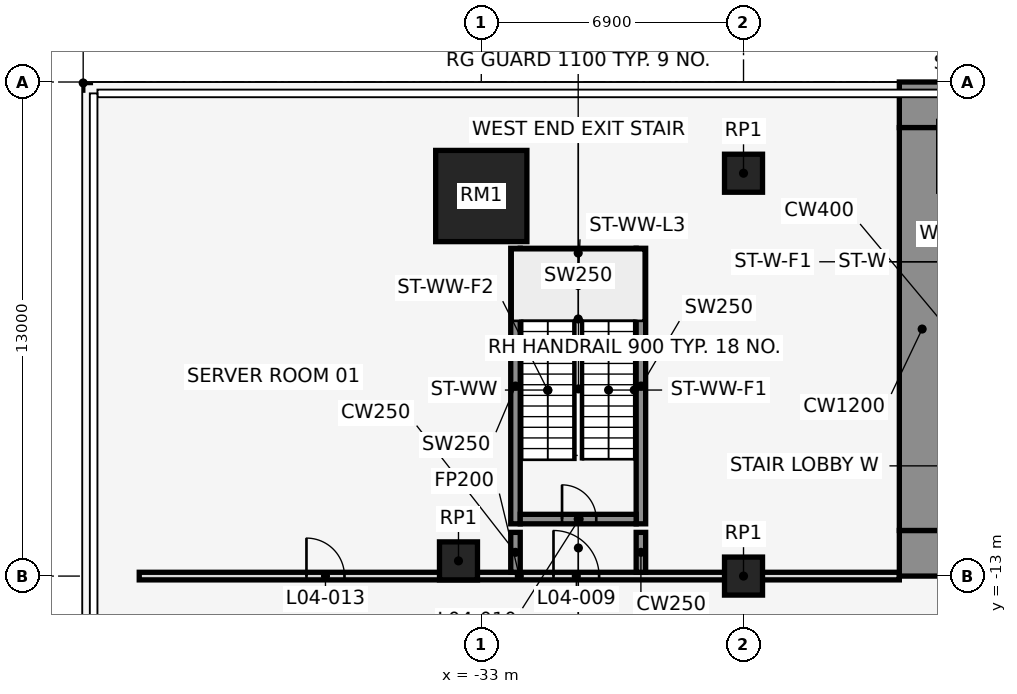
"""IFC4 building model, lengths in metres.
Left out: names, types, materials, properties, quantities, classifications, styles, units other than length and angle.
Written with IfcOpenShell. Run it as: python <this file> out.ifc"""

import sys

from ifc_helpers import new_model, si_unit, direction, frame, frame_2d, origin, origin_2d, place, context, subcontext, project, spatial, rectangle, extrude, element, fill, save


model = new_model("IFC4")
c1 = context("Model", 3, precision=1e-05, world=origin(), true_north=direction((0.0, 1.0)))
c2 = subcontext(c1, "Body", "Model", "MODEL_VIEW")
j1 = project(units=[si_unit("LENGTHUNIT", "METRE"), si_unit("PLANEANGLEUNIT", "RADIAN")], contexts=[c1])
p1 = place(None, origin())
s1 = spatial("IfcSite", under=j1, at=p1, CompositionType="ELEMENT")
p2 = place(p1, origin())
s2 = spatial("IfcBuilding", under=s1, at=p2, CompositionType="ELEMENT")
p3 = place(p2, frame((0.0, 0.0, 25.0)))
s3 = spatial("IfcBuildingStorey", under=s2, at=p3, CompositionType="ELEMENT", Elevation=25.0)
p4 = place(p3, frame((-33.0, -3.0, 0.0), z_axis=(0.0, 0.0, 1.0), x_axis=(1.0, 0.0, 0.0)))
e1 = element("IfcColumn", 1, at=p4, inside=s3, PredefinedType="COLUMN", context=c2, shape_type="SweptSolid", body=[
    extrude(rectangle(XDim=2.4, YDim=2.4, at=origin_2d()), origin(), (0.0, 0.0, 1.0), 5.0),
])
for number, where, z_axis, x_axis in (
    (2, (-26.1, -2.4, 0.0), (0.0, 0.0, 1.0), (1.0, 0.0, 0.0)),
    (3, (-33.6, -12.6, 0.0), (0.0, 0.0, 1.0), (1.0, 0.0, 0.0)),
    (4, (-26.1, -13.0, 0.0), (0.0, 0.0, 1.0), (1.0, 0.0, 0.0)),
):
    element("IfcColumn", number, at=place(p3, frame(where, z_axis=z_axis, x_axis=x_axis)), inside=s3, PredefinedType="COLUMN", context=c2, shape_type="SweptSolid", body=[
        extrude(rectangle(XDim=1.0, YDim=1.0, at=origin_2d()), origin(), (0.0, 0.0, 1.0), 5.0),
    ])
for number, where, z_axis, x_axis in (
    (5, (-32.1, -11.625, 0.0), (0.0, 0.0, 1.0), (0.0, 1.0, 0.0)),
    (6, (-28.8, -11.625, 0.0), (0.0, 0.0, 1.0), (0.0, 1.0, 0.0)),
):
    element("IfcWall", number, at=place(p3, frame(where, z_axis=z_axis, x_axis=x_axis)), inside=s3, PredefinedType="SHEAR", context=c2, shape_type="SweptSolid", body=[
        extrude(rectangle(XDim=7.25, YDim=0.25, at=frame_2d((3.625, 0.0))), origin(), (0.0, 0.0, 1.0), 5.0),
    ])
p5 = place(p3, frame((-31.975, -11.5, 0.0), z_axis=(0.0, 0.0, 1.0), x_axis=(1.0, 0.0, 0.0)))
e7 = element("IfcWall", 7, at=p5, inside=s3, PredefinedType="SHEAR", context=c2, shape_type="SweptSolid", body=[
    extrude(rectangle(XDim=3.05, YDim=0.25, at=frame_2d((1.525, 0.0))), origin(), (0.0, 0.0, 1.0), 5.0),
])
p6 = place(p5, frame((1.1, 0.0, 0.0)))
e8 = element("IfcOpeningElement", 8, at=p6, cuts=e7, PredefinedType="OPENING", context=c2, shape_type="SweptSolid", body=[
    extrude(rectangle(XDim=0.9, YDim=2.1, at=frame_2d((0.45, 1.05))), frame((0.0, 0.137, 0.0), z_axis=(0.0, -1.0, 0.0), x_axis=(1.0, 0.0, 0.0)), (0.0, 0.0, 1.0), 0.274),
])
p7 = place(p3, frame((-31.975, -4.5, 0.0), z_axis=(0.0, 0.0, 1.0), x_axis=(1.0, 0.0, 0.0)))
e9 = element("IfcWall", 9, at=p7, inside=s3, PredefinedType="SHEAR", context=c2, shape_type="SweptSolid", body=[
    extrude(rectangle(XDim=3.05, YDim=0.25, at=frame_2d((1.525, 0.0))), origin(), (0.0, 0.0, 1.0), 5.0),
])
p8 = place(p3, frame((-42.0, -13.0, 0.0), z_axis=(0.0, 0.0, 1.0), x_axis=(1.0, 0.0, 0.0)))
e10 = element("IfcWall", 10, at=p8, inside=s3, PredefinedType="PARTITIONING", context=c2, shape_type="SweptSolid", body=[
    extrude(rectangle(XDim=20.0, YDim=0.2, at=frame_2d((10.0, 0.0))), origin(), (0.0, 0.0, 1.0), 4.7),
])
p9 = place(p8, frame((10.9, 0.0, 0.0)))
e11 = element("IfcOpeningElement", 11, at=p9, cuts=e10, PredefinedType="OPENING", context=c2, shape_type="SweptSolid", body=[
    extrude(rectangle(XDim=1.2, YDim=2.1, at=frame_2d((0.6, 1.05))), frame((0.0, 0.112, 0.0), z_axis=(0.0, -1.0, 0.0), x_axis=(1.0, 0.0, 0.0)), (0.0, 0.0, 1.0), 0.224),
])
p10 = place(p8, frame((4.4, 0.0, 0.0)))
e12 = element("IfcOpeningElement", 12, at=p10, cuts=e10, PredefinedType="OPENING", context=c2, shape_type="SweptSolid", body=[
    extrude(rectangle(XDim=1.0, YDim=2.1, at=frame_2d((0.5, 1.05))), frame((0.0, 0.112, 0.0), z_axis=(0.0, -1.0, 0.0), x_axis=(1.0, 0.0, 0.0)), (0.0, 0.0, 1.0), 0.224),
])
for number, where, z_axis, x_axis in (
    (13, (-32.1, -12.9, 0.0), (0.0, 0.0, 1.0), (0.0, 1.0, 0.0)),
    (14, (-28.8, -12.9, 0.0), (0.0, 0.0, 1.0), (0.0, 1.0, 0.0)),
):
    element("IfcWall", number, at=place(p3, frame(where, z_axis=z_axis, x_axis=x_axis)), inside=s3, PredefinedType="SHEAR", context=c2, shape_type="SweptSolid", body=[
        extrude(rectangle(XDim=1.05, YDim=0.25, at=frame_2d((0.525, 0.0))), origin(), (0.0, 0.0, 1.0), 5.0),
    ])
p11 = place(p3, frame((-22.0, -0.6, 0.0), z_axis=(0.0, 0.0, 1.0), x_axis=(1.0, 0.0, 0.0)))
e15 = element("IfcWall", 15, at=p11, inside=s3, PredefinedType="SHEAR", context=c2, shape_type="SweptSolid", body=[
    extrude(rectangle(XDim=44.0, YDim=1.2, at=frame_2d((22.0, 0.0))), origin(), (0.0, 0.0, 1.0), 5.0),
])
p12 = place(p3, frame((-22.0, -12.4, 0.0), z_axis=(0.0, 0.0, 1.0), x_axis=(1.0, 0.0, 0.0)))
e16 = element("IfcWall", 16, at=p12, inside=s3, PredefinedType="SHEAR", context=c2, shape_type="SweptSolid", body=[
    extrude(rectangle(XDim=44.0, YDim=1.2, at=frame_2d((22.0, 0.0))), origin(), (0.0, 0.0, 1.0), 5.0),
])
p13 = place(p12, frame((2.2, 0.0, 0.0)))
e17 = element("IfcOpeningElement", 17, at=p13, cuts=e16, PredefinedType="OPENING", context=c2, shape_type="SweptSolid", body=[
    extrude(rectangle(XDim=1.2, YDim=2.1, at=frame_2d((0.6, 1.05))), frame((0.0, 0.612, 0.0), z_axis=(0.0, -1.0, 0.0), x_axis=(1.0, 0.0, 0.0)), (0.0, 0.0, 1.0), 1.224),
])
p14 = place(p12, frame((21.4, 0.0, 0.0)))
e18 = element("IfcOpeningElement", 18, at=p14, cuts=e16, PredefinedType="OPENING", context=c2, shape_type="SweptSolid", body=[
    extrude(rectangle(XDim=1.2, YDim=2.1, at=frame_2d((0.6, 1.05))), frame((0.0, 0.612, 0.0), z_axis=(0.0, -1.0, 0.0), x_axis=(1.0, 0.0, 0.0)), (0.0, 0.0, 1.0), 1.224),
])
p15 = place(p12, frame((40.6, 0.0, 0.0)))
e19 = element("IfcOpeningElement", 19, at=p15, cuts=e16, PredefinedType="OPENING", context=c2, shape_type="SweptSolid", body=[
    extrude(rectangle(XDim=1.2, YDim=2.1, at=frame_2d((0.6, 1.05))), frame((0.0, 0.612, 0.0), z_axis=(0.0, -1.0, 0.0), x_axis=(1.0, 0.0, 0.0)), (0.0, 0.0, 1.0), 1.224),
])
p16 = place(p12, frame((16.0, 0.0, 0.0)))
e20 = element("IfcOpeningElement", 20, at=p16, cuts=e16, PredefinedType="OPENING", context=c2, shape_type="SweptSolid", body=[
    extrude(rectangle(XDim=1.8, YDim=2.1, at=frame_2d((0.9, 1.05))), frame((0.0, 0.612, 0.0), z_axis=(0.0, -1.0, 0.0), x_axis=(1.0, 0.0, 0.0)), (0.0, 0.0, 1.0), 1.224),
])
p17 = place(p12, frame((6.3, 0.0, 0.0)))
e21 = element("IfcOpeningElement", 21, at=p17, cuts=e16, PredefinedType="OPENING", context=c2, shape_type="SweptSolid", body=[
    extrude(rectangle(XDim=1.2, YDim=2.1, at=frame_2d((0.6, 1.05))), frame((0.0, 0.612, 0.0), z_axis=(0.0, -1.0, 0.0), x_axis=(1.0, 0.0, 0.0)), (0.0, 0.0, 1.0), 1.224),
])
p18 = place(p12, frame((26.2, 0.0, 0.0)))
e22 = element("IfcOpeningElement", 22, at=p18, cuts=e16, PredefinedType="OPENING", context=c2, shape_type="SweptSolid", body=[
    extrude(rectangle(XDim=1.8, YDim=2.1, at=frame_2d((0.9, 1.05))), frame((0.0, 0.612, 0.0), z_axis=(0.0, -1.0, 0.0), x_axis=(1.0, 0.0, 0.0)), (0.0, 0.0, 1.0), 1.224),
])
p19 = place(p12, frame((36.5, 0.0, 0.0)))
e23 = element("IfcOpeningElement", 23, at=p19, cuts=e16, PredefinedType="OPENING", context=c2, shape_type="SweptSolid", body=[
    extrude(rectangle(XDim=1.2, YDim=2.1, at=frame_2d((0.6, 1.05))), frame((0.0, 0.612, 0.0), z_axis=(0.0, -1.0, 0.0), x_axis=(1.0, 0.0, 0.0)), (0.0, 0.0, 1.0), 1.224),
])
p20 = place(p3, frame((-21.4, -11.8, 0.0), z_axis=(0.0, 0.0, 1.0), x_axis=(0.0, 1.0, 0.0)))
e24 = element("IfcWall", 24, at=p20, inside=s3, PredefinedType="SHEAR", context=c2, shape_type="SweptSolid", body=[
    extrude(rectangle(XDim=10.6, YDim=1.2, at=frame_2d((5.3, 0.0))), origin(), (0.0, 0.0, 1.0), 5.0),
])
p21 = place(p9, origin())
e25 = element("IfcDoor", 25, at=p21, inside=s3, OperationType="SINGLE_SWING_RIGHT", PredefinedType="DOOR", context=c2, shape_type="SweptSolid", body=[
    extrude(rectangle(XDim=1.2, YDim=2.1, at=frame_2d((0.6, 1.05))), frame((0.0, 0.025, 0.0), z_axis=(0.0, -1.0, 0.0), x_axis=(1.0, 0.0, 0.0)), (0.0, 0.0, 1.0), 0.05),
])
fill(e11, e25)
p22 = place(p6, origin())
e26 = element("IfcDoor", 26, at=p22, inside=s3, OperationType="SINGLE_SWING_LEFT", PredefinedType="DOOR", context=c2, shape_type="SweptSolid", body=[
    extrude(rectangle(XDim=0.9, YDim=2.1, at=frame_2d((0.45, 1.05))), frame((0.0, 0.025, 0.0), z_axis=(0.0, -1.0, 0.0), x_axis=(1.0, 0.0, 0.0)), (0.0, 0.0, 1.0), 0.05),
])
fill(e8, e26)
p23 = place(p10, origin())
e27 = element("IfcDoor", 27, at=p23, inside=s3, OperationType="SINGLE_SWING_LEFT", PredefinedType="DOOR", context=c2, shape_type="SweptSolid", body=[
    extrude(rectangle(XDim=1.0, YDim=2.1, at=frame_2d((0.5, 1.05))), frame((0.0, 0.025, 0.0), z_axis=(0.0, -1.0, 0.0), x_axis=(1.0, 0.0, 0.0)), (0.0, 0.0, 1.0), 0.05),
])
fill(e12, e27)
save(model, sys.argv[1])
